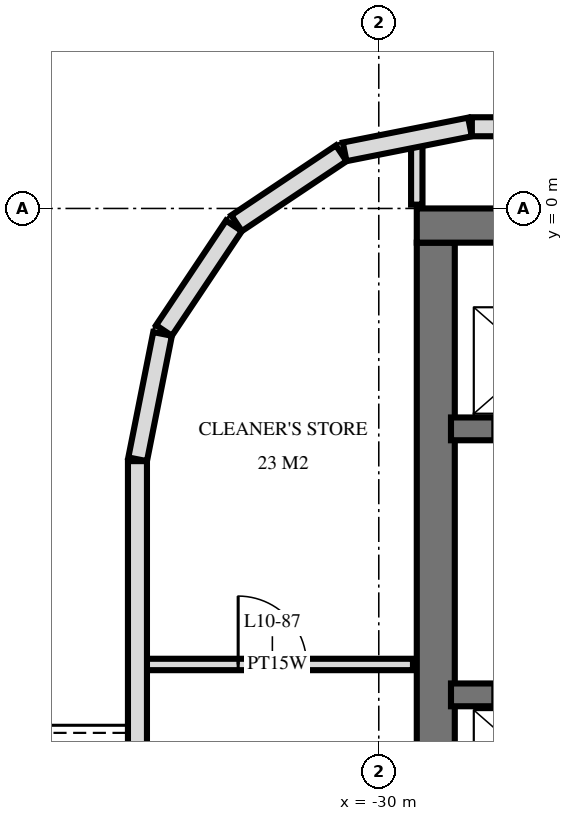
"""IFC4 building model, lengths in metres.
Left out: names, types, materials, properties, quantities, classifications, styles, units other than length and angle.
Written with IfcOpenShell. Run it as: python <this file> out.ifc"""

import sys

from ifc_helpers import new_model, si_unit, direction, frame, frame_2d, origin, place, context, subcontext, project, spatial, rectangle, extrude, element, fill, save


model = new_model("IFC4")
c1 = context("Model", 3, precision=1e-05, world=origin(), true_north=direction((0.0, 1.0)))
c2 = subcontext(c1, "Body", "Model", "MODEL_VIEW")
j1 = project(units=[si_unit("LENGTHUNIT", "METRE"), si_unit("PLANEANGLEUNIT", "RADIAN")], contexts=[c1])
p1 = place(None, origin())
s1 = spatial("IfcSite", under=j1, at=p1, CompositionType="ELEMENT")
p2 = place(p1, origin())
s2 = spatial("IfcBuilding", under=s1, at=p2, CompositionType="ELEMENT")
p3 = place(p2, frame((0.0, 0.0, 45.6)))
s3 = spatial("IfcBuildingStorey", under=s2, at=p3, CompositionType="ELEMENT", Elevation=45.6)
p4 = place(p3, frame((-29.5, -0.225, 0.0), z_axis=(0.0, 0.0, 1.0), x_axis=(1.0, 0.0, 0.0)))
e1 = element("IfcWall", 1, at=p4, inside=s3, PredefinedType="SHEAR", context=c2, shape_type="SweptSolid", body=[
    extrude(rectangle(XDim=19.5, YDim=0.45, at=frame_2d((9.75, 0.0))), origin(), (0.0, 0.0, 1.0), 3.6),
])
p5 = place(p3, frame((-29.25, -14.55, 0.0), z_axis=(0.0, 0.0, 1.0), x_axis=(0.0, 1.0, 0.0)))
e2 = element("IfcWall", 2, at=p5, inside=s3, PredefinedType="SHEAR", context=c2, shape_type="SweptSolid", body=[
    extrude(rectangle(XDim=14.1, YDim=0.5, at=frame_2d((7.05, 0.0))), origin(), (0.0, 0.0, 1.0), 3.6),
])
p6 = place(p3, frame((-29.05, -2.9, 0.0), z_axis=(0.0, 0.0, 1.0), x_axis=(1.0, 0.0, 0.0)))
e3 = element("IfcWall", 3, at=p6, inside=s3, PredefinedType="SHEAR", context=c2, shape_type="SweptSolid", body=[
    extrude(rectangle(XDim=18.7, YDim=0.3, at=frame_2d((9.35, 0.0))), origin(), (0.0, 0.0, 1.0), 3.6),
])
p7 = place(p6, frame((2.95, 0.0, 0.0)))
e4 = element("IfcOpeningElement", 4, at=p7, cuts=e3, PredefinedType="OPENING", context=c2, shape_type="SweptSolid", body=[
    extrude(rectangle(XDim=1.1, YDim=2.1, at=frame_2d((0.55, 1.05))), frame((0.0, 0.16, 0.0), z_axis=(0.0, -1.0, 0.0), x_axis=(1.0, 0.0, 0.0)), (0.0, 0.0, 1.0), 0.32),
])
p8 = place(p6, frame((0.55, 0.0, 0.0)))
e5 = element("IfcOpeningElement", 5, at=p8, cuts=e3, PredefinedType="OPENING", context=c2, shape_type="SweptSolid", body=[
    extrude(rectangle(XDim=1.1, YDim=2.1, at=frame_2d((0.55, 1.05))), frame((0.0, 0.16, 0.0), z_axis=(0.0, -1.0, 0.0), x_axis=(1.0, 0.0, 0.0)), (0.0, 0.0, 1.0), 0.32),
])
p9 = place(p6, frame((10.9, 0.0, 0.0)))
e6 = element("IfcOpeningElement", 6, at=p9, cuts=e3, PredefinedType="OPENING", context=c2, shape_type="SweptSolid", body=[
    extrude(rectangle(XDim=0.9, YDim=2.1, at=frame_2d((0.45, 1.05))), frame((0.0, 0.16, 0.0), z_axis=(0.0, -1.0, 0.0), x_axis=(1.0, 0.0, 0.0)), (0.0, 0.0, 1.0), 0.32),
])
p10 = place(p6, frame((16.85, 0.0, 0.0)))
e7 = element("IfcOpeningElement", 7, at=p10, cuts=e3, PredefinedType="OPENING", context=c2, shape_type="SweptSolid", body=[
    extrude(rectangle(XDim=1.0, YDim=2.1, at=frame_2d((0.5, 1.05))), frame((0.0, 0.16, 0.0), z_axis=(0.0, -1.0, 0.0), x_axis=(1.0, 0.0, 0.0)), (0.0, 0.0, 1.0), 0.32),
])
p11 = place(p6, frame((14.312, 0.0, 0.0)))
e8 = element("IfcOpeningElement", 8, at=p11, cuts=e3, PredefinedType="OPENING", context=c2, shape_type="SweptSolid", body=[
    extrude(rectangle(XDim=1.0, YDim=2.1, at=frame_2d((0.5, 1.05))), frame((0.0, 0.16, 0.0), z_axis=(0.0, -1.0, 0.0), x_axis=(1.0, 0.0, 0.0)), (0.0, 0.0, 1.0), 0.32),
])
p12 = place(p6, frame((12.887, 0.0, 0.0)))
e9 = element("IfcOpeningElement", 9, at=p12, cuts=e3, PredefinedType="OPENING", context=c2, shape_type="SweptSolid", body=[
    extrude(rectangle(XDim=1.0, YDim=2.1, at=frame_2d((0.5, 1.05))), frame((0.0, 0.16, 0.0), z_axis=(0.0, -1.0, 0.0), x_axis=(1.0, 0.0, 0.0)), (0.0, 0.0, 1.0), 0.32),
])
p13 = place(p6, frame((5.6, 0.0, 0.0)))
e10 = element("IfcOpeningElement", 10, at=p13, cuts=e3, PredefinedType="OPENING", context=c2, shape_type="SweptSolid", body=[
    extrude(rectangle(XDim=1.0, YDim=2.1, at=frame_2d((0.5, 1.05))), frame((0.0, 0.16, 0.0), z_axis=(0.0, -1.0, 0.0), x_axis=(1.0, 0.0, 0.0)), (0.0, 0.0, 1.0), 0.32),
])
p14 = place(p3, frame((-29.05, -6.4, 0.0), z_axis=(0.0, 0.0, 1.0), x_axis=(1.0, 0.0, 0.0)))
e11 = element("IfcWall", 11, at=p14, inside=s3, PredefinedType="SHEAR", context=c2, shape_type="SweptSolid", body=[
    extrude(rectangle(XDim=18.7, YDim=0.3, at=frame_2d((9.35, 0.0))), origin(), (0.0, 0.0, 1.0), 3.6),
])
p15 = place(p14, frame((2.95, 0.0, 0.0)))
e12 = element("IfcOpeningElement", 12, at=p15, cuts=e11, PredefinedType="OPENING", context=c2, shape_type="SweptSolid", body=[
    extrude(rectangle(XDim=1.1, YDim=2.1, at=frame_2d((0.55, 1.05))), frame((0.0, 0.16, 0.0), z_axis=(0.0, -1.0, 0.0), x_axis=(1.0, 0.0, 0.0)), (0.0, 0.0, 1.0), 0.32),
])
p16 = place(p14, frame((0.55, 0.0, 0.0)))
e13 = element("IfcOpeningElement", 13, at=p16, cuts=e11, PredefinedType="OPENING", context=c2, shape_type="SweptSolid", body=[
    extrude(rectangle(XDim=1.1, YDim=2.1, at=frame_2d((0.55, 1.05))), frame((0.0, 0.16, 0.0), z_axis=(0.0, -1.0, 0.0), x_axis=(1.0, 0.0, 0.0)), (0.0, 0.0, 1.0), 0.32),
])
p17 = place(p14, frame((10.8, 0.0, 0.0)))
e14 = element("IfcOpeningElement", 14, at=p17, cuts=e11, PredefinedType="OPENING", context=c2, shape_type="SweptSolid", body=[
    extrude(rectangle(XDim=1.1, YDim=2.1, at=frame_2d((0.55, 1.05))), frame((0.0, 0.16, 0.0), z_axis=(0.0, -1.0, 0.0), x_axis=(1.0, 0.0, 0.0)), (0.0, 0.0, 1.0), 0.32),
])
p18 = place(p14, frame((5.6, 0.0, 0.0)))
e15 = element("IfcOpeningElement", 15, at=p18, cuts=e11, PredefinedType="OPENING", context=c2, shape_type="SweptSolid", body=[
    extrude(rectangle(XDim=1.0, YDim=2.1, at=frame_2d((0.5, 1.05))), frame((0.0, 0.16, 0.0), z_axis=(0.0, -1.0, 0.0), x_axis=(1.0, 0.0, 0.0)), (0.0, 0.0, 1.0), 0.32),
])
p19 = place(p3, frame((28.775, 1.075, 0.0), z_axis=(0.0, 0.0, 1.0), x_axis=(-1.0, 0.0, 0.0)))
e16 = element("IfcWall", 16, at=p19, inside=s3, PredefinedType="SOLIDWALL", context=c2, shape_type="SweptSolid", body=[
    extrude(rectangle(XDim=57.551, YDim=0.25, at=frame_2d((28.775, 0.0))), origin(), (0.0, 0.0, 1.0), 3.32),
])
p20 = place(p19, frame((25.575, 0.0, 0.3)))
e17 = element("IfcOpeningElement", 17, at=p20, cuts=e16, PredefinedType="OPENING", context=c2, shape_type="SweptSolid", body=[
    extrude(rectangle(XDim=2.4, YDim=2.1, at=frame_2d((1.2, 1.05))), frame((0.0, 0.135, 0.0), z_axis=(0.0, -1.0, 0.0), x_axis=(1.0, 0.0, 0.0)), (0.0, 0.0, 1.0), 0.27),
])
p21 = place(p19, frame((30.275, 0.0, 0.3)))
e18 = element("IfcOpeningElement", 18, at=p21, cuts=e16, PredefinedType="OPENING", context=c2, shape_type="SweptSolid", body=[
    extrude(rectangle(XDim=2.4, YDim=2.1, at=frame_2d((1.2, 1.05))), frame((0.0, 0.135, 0.0), z_axis=(0.0, -1.0, 0.0), x_axis=(1.0, 0.0, 0.0)), (0.0, 0.0, 1.0), 0.27),
])
p22 = place(p19, frame((33.275, 0.0, 0.3)))
e19 = element("IfcOpeningElement", 19, at=p22, cuts=e16, PredefinedType="OPENING", context=c2, shape_type="SweptSolid", body=[
    extrude(rectangle(XDim=2.4, YDim=2.1, at=frame_2d((1.2, 1.05))), frame((0.0, 0.135, 0.0), z_axis=(0.0, -1.0, 0.0), x_axis=(1.0, 0.0, 0.0)), (0.0, 0.0, 1.0), 0.27),
])
p23 = place(p3, frame((-28.8, 1.073, 0.0), z_axis=(0.0, 0.0, 1.0), x_axis=(-0.980803419081, -0.194999110559, 0.0)))
e20 = element("IfcWall", 20, at=p23, inside=s3, PredefinedType="SOLIDWALL", context=c2, shape_type="SweptSolid", body=[
    extrude(rectangle(XDim=1.681, YDim=0.25, at=frame_2d((0.841, 0.0))), origin(), (0.0, 0.0, 1.0), 3.32),
])
for number, where, z_axis, x_axis in (
    (21, (-30.494, 0.726, 0.0), (0.0, 0.0, 1.0), (-0.831, -0.556, 0.0)),
    (22, (-31.906, -0.229, 0.0), (0.0, 0.0, 1.0), (-0.556, -0.831, 0.0)),
):
    element("IfcWall", number, at=place(p3, frame(where, z_axis=z_axis, x_axis=x_axis)), inside=s3, PredefinedType="SOLIDWALL", context=c2, shape_type="SweptSolid", body=[
        extrude(rectangle(XDim=1.656, YDim=0.25, at=frame_2d((0.828, 0.0))), origin(), (0.0, 0.0, 1.0), 3.32),
    ])
p24 = place(p3, frame((-32.844, -1.651, 0.0), z_axis=(0.0, 0.0, 1.0), x_axis=(-0.19513878023, -0.980775640221, 0.0)))
e23 = element("IfcWall", 23, at=p24, inside=s3, PredefinedType="SOLIDWALL", context=c2, shape_type="SweptSolid", body=[
    extrude(rectangle(XDim=1.681, YDim=0.25, at=frame_2d((0.841, 0.0))), origin(), (0.0, 0.0, 1.0), 3.32),
])
p25 = place(p3, frame((-33.175, -3.325, 0.0), z_axis=(0.0, 0.0, 1.0), x_axis=(0.0, -1.0, 0.0)))
e24 = element("IfcWall", 24, at=p25, inside=s3, PredefinedType="SOLIDWALL", context=c2, shape_type="SweptSolid", body=[
    extrude(rectangle(XDim=21.551, YDim=0.25, at=frame_2d((10.775, 0.0))), origin(), (0.0, 0.0, 1.0), 3.32),
])
p26 = place(p25, frame((6.65, 0.0, 0.0)))
e25 = element("IfcOpeningElement", 25, at=p26, cuts=e24, PredefinedType="OPENING", context=c2, shape_type="SweptSolid", body=[
    extrude(rectangle(XDim=1.8, YDim=2.4, at=frame_2d((0.9, 1.2))), frame((0.0, 0.135, 0.0), z_axis=(0.0, -1.0, 0.0), x_axis=(1.0, 0.0, 0.0)), (0.0, 0.0, 1.0), 0.27),
])
p27 = place(p25, frame((12.275, 0.0, 0.3)))
e26 = element("IfcOpeningElement", 26, at=p27, cuts=e24, PredefinedType="OPENING", context=c2, shape_type="SweptSolid", body=[
    extrude(rectangle(XDim=1.2, YDim=2.1, at=frame_2d((0.6, 1.05))), frame((0.0, 0.135, 0.0), z_axis=(0.0, -1.0, 0.0), x_axis=(1.0, 0.0, 0.0)), (0.0, 0.0, 1.0), 0.27),
])
p28 = place(p25, frame((14.675, 0.0, 0.0)))
e27 = element("IfcOpeningElement", 27, at=p28, cuts=e24, PredefinedType="OPENING", context=c2, shape_type="SweptSolid", body=[
    extrude(rectangle(XDim=1.8, YDim=2.4, at=frame_2d((0.9, 1.2))), frame((0.0, 0.135, 0.0), z_axis=(0.0, -1.0, 0.0), x_axis=(1.0, 0.0, 0.0)), (0.0, 0.0, 1.0), 0.27),
])
p29 = place(p25, frame((18.875, 0.0, 0.0)))
e28 = element("IfcOpeningElement", 28, at=p29, cuts=e24, PredefinedType="OPENING", context=c2, shape_type="SweptSolid", body=[
    extrude(rectangle(XDim=1.8, YDim=2.4, at=frame_2d((0.9, 1.2))), frame((0.0, 0.135, 0.0), z_axis=(0.0, -1.0, 0.0), x_axis=(1.0, 0.0, 0.0)), (0.0, 0.0, 1.0), 0.27),
])
p30 = place(p3, frame((-29.5, 0.05, 0.0), z_axis=(0.0, 0.0, 1.0), x_axis=(0.0, 1.0, 0.0)))
e29 = element("IfcWall", 29, at=p30, inside=s3, PredefinedType="PARTITIONING", context=c2, shape_type="SweptSolid", body=[
    extrude(rectangle(XDim=0.827, YDim=0.15, at=frame_2d((0.414, 0.0))), origin(), (0.0, 0.0, 1.0), 3.32),
])
p31 = place(p3, frame((-33.12, -6.0, 0.0), z_axis=(0.0, 0.0, 1.0), x_axis=(1.0, 0.0, 0.0)))
e30 = element("IfcWall", 30, at=p31, inside=s3, PredefinedType="PLUMBINGWALL", context=c2, shape_type="SweptSolid", body=[
    extrude(rectangle(XDim=3.57, YDim=0.15, at=frame_2d((1.785, 0.0))), origin(), (0.0, 0.0, 1.0), 3.32),
])
p32 = place(p31, frame((1.27, 0.0, 0.0)))
e31 = element("IfcOpeningElement", 31, at=p32, cuts=e30, PredefinedType="OPENING", context=c2, shape_type="SweptSolid", body=[
    extrude(rectangle(XDim=0.9, YDim=2.1, at=frame_2d((0.45, 1.05))), frame((0.0, 0.085, 0.0), z_axis=(0.0, -1.0, 0.0), x_axis=(1.0, 0.0, 0.0)), (0.0, 0.0, 1.0), 0.17),
])
p33 = place(p32, origin())
e32 = element("IfcDoor", 32, at=p33, inside=s3, OperationType="SINGLE_SWING_RIGHT", PredefinedType="DOOR", context=c2, shape_type="SweptSolid", body=[
    extrude(rectangle(XDim=0.9, YDim=2.1, at=frame_2d((0.45, 1.05))), frame((0.0, 0.025, 0.0), z_axis=(0.0, -1.0, 0.0), x_axis=(1.0, 0.0, 0.0)), (0.0, 0.0, 1.0), 0.05),
])
fill(e31, e32)
save(model, sys.argv[1])
